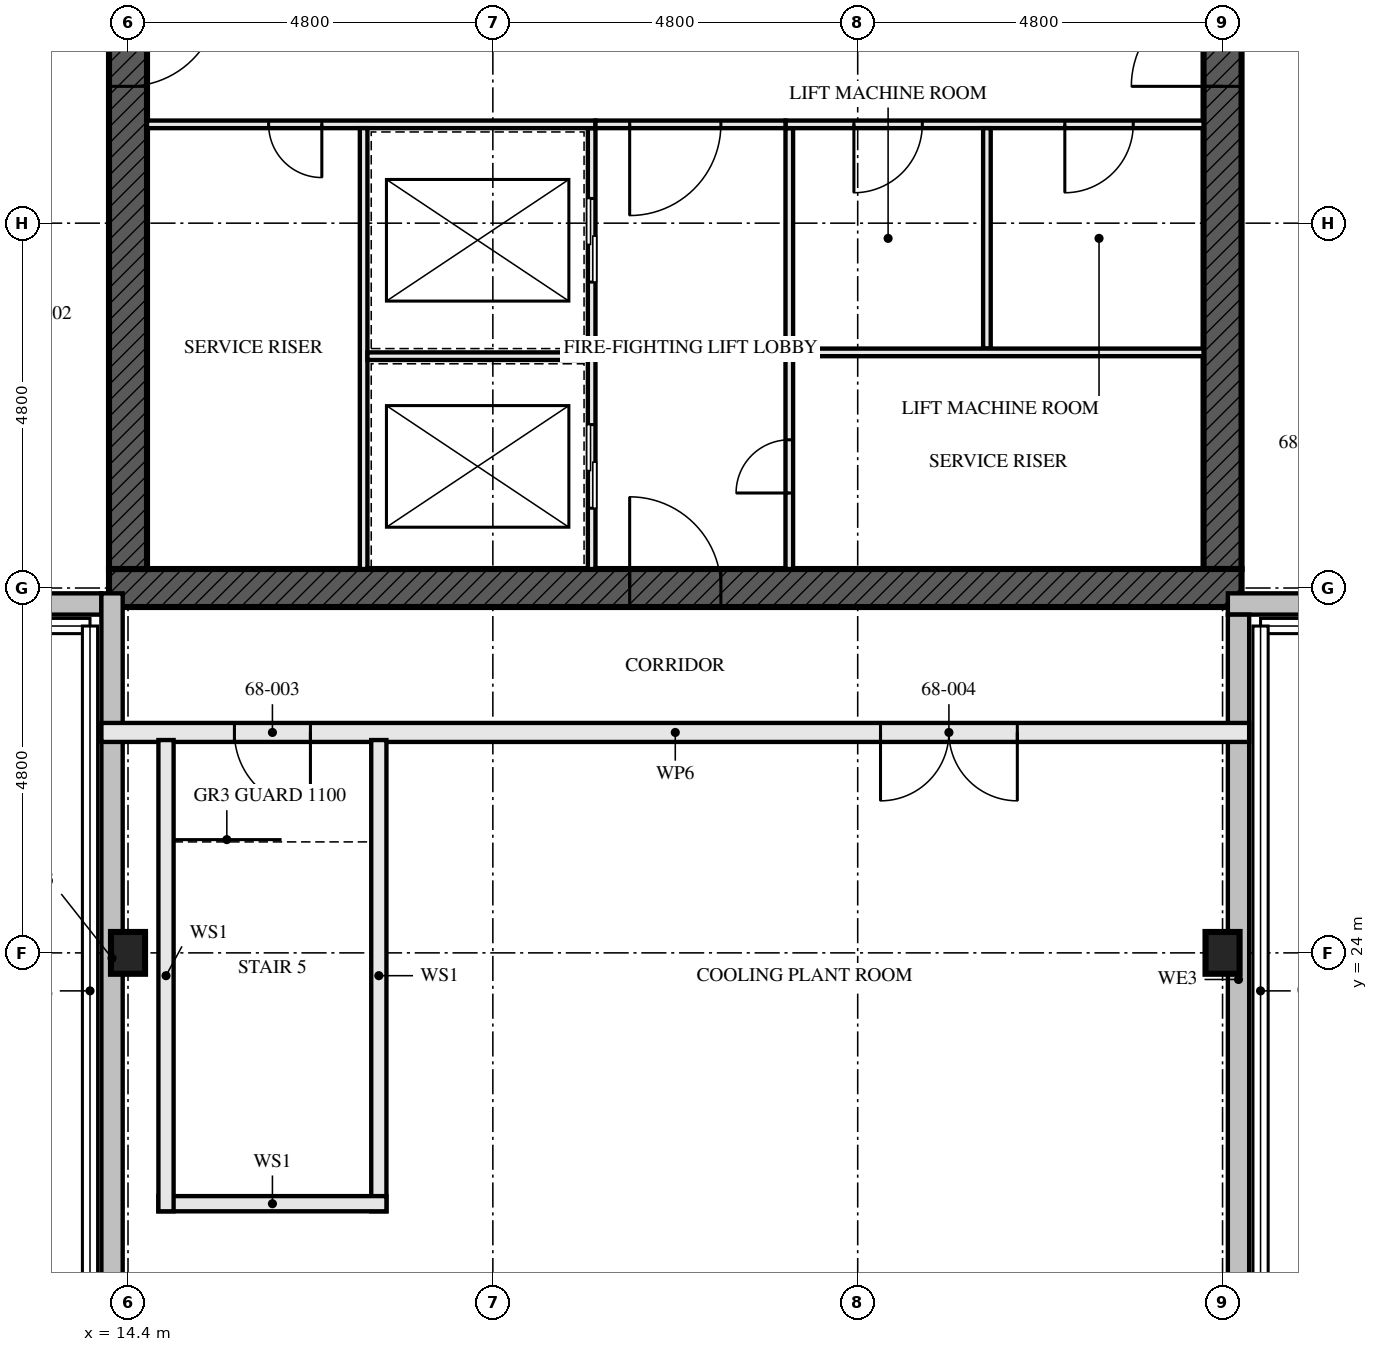
"""IFC4 building model, lengths in metres.
Left out: names, types, materials, properties, quantities, classifications, styles, units other than length and angle.
Written with IfcOpenShell. Run it as: python <this file> out.ifc"""

import sys

from ifc_helpers import new_model, si_unit, direction, frame, frame_2d, origin, origin_2d, place, context, subcontext, project, spatial, rectangle, i_section, extrude, element, fill, save


model = new_model("IFC4")
c1 = context("Model", 3, precision=1e-05, world=origin(), true_north=direction((0.0, 1.0)))
c2 = subcontext(c1, "Body", "Model", "MODEL_VIEW")
j1 = project(units=[si_unit("LENGTHUNIT", "METRE"), si_unit("PLANEANGLEUNIT", "RADIAN")], contexts=[c1])
p1 = place(None, origin())
s1 = spatial("IfcSite", under=j1, at=p1, CompositionType="ELEMENT")
p2 = place(p1, origin())
s2 = spatial("IfcBuilding", under=s1, at=p2, CompositionType="ELEMENT")
p3 = place(p2, frame((0.0, 0.0, 248.0)))
s3 = spatial("IfcBuildingStorey", under=s2, at=p3, CompositionType="ELEMENT", Elevation=248.0)
for number, where, z_axis, x_axis in (
    (1, (14.4, 24.0, 0.0), (0.0, 0.0, 1.0), (1.0, 0.0, 0.0)),
    (2, (28.8, 24.0, 0.0), (0.0, 0.0, 1.0), (1.0, 0.0, 0.0)),
):
    element("IfcColumn", number, at=place(p3, frame(where, z_axis=z_axis, x_axis=x_axis)), inside=s3, PredefinedType="COLUMN", context=c2, shape_type="SweptSolid", body=[
        extrude(i_section(OverallWidth=0.448, OverallDepth=0.55, WebThickness=0.072, FlangeThickness=0.115, FilletRadius=0.015, at=origin_2d()), origin(), (0.0, 0.0, 1.0), 4.25),
    ])
p4 = place(p3, frame((14.15, 28.8, -0.25), z_axis=(0.0, 0.0, 1.0), x_axis=(1.0, 0.0, 0.0)))
e3 = element("IfcWall", 3, at=p4, inside=s3, PredefinedType="SHEAR", context=c2, shape_type="SweptSolid", body=[
    extrude(rectangle(XDim=14.9, YDim=0.5, at=frame_2d((7.45, 0.0))), origin(), (0.0, 0.0, 1.0), 4.5),
])
p5 = place(p4, frame((6.85, 0.0, 0.25)))
e4 = element("IfcOpeningElement", 4, at=p5, cuts=e3, PredefinedType="OPENING", context=c2, shape_type="SweptSolid", body=[
    extrude(rectangle(XDim=1.2, YDim=2.1, at=frame_2d((0.6, 1.05))), frame((0.0, 0.26, 0.0), z_axis=(0.0, -1.0, 0.0), x_axis=(1.0, 0.0, 0.0)), (0.0, 0.0, 1.0), 0.521),
])
p6 = place(p3, frame((14.4, 42.95, -0.25), z_axis=(0.0, 0.0, 1.0), x_axis=(0.0, -1.0, 0.0)))
e5 = element("IfcWall", 5, at=p6, inside=s3, PredefinedType="SHEAR", context=c2, shape_type="SweptSolid", body=[
    extrude(rectangle(XDim=13.9, YDim=0.5, at=frame_2d((6.95, 0.0))), origin(), (0.0, 0.0, 1.0), 4.5),
])
p7 = place(p6, frame((6.35, 0.0, 0.25)))
e6 = element("IfcOpeningElement", 6, at=p7, cuts=e5, PredefinedType="OPENING", context=c2, shape_type="SweptSolid", body=[
    extrude(rectangle(XDim=1.2, YDim=2.1, at=frame_2d((0.6, 1.05))), frame((0.0, 0.26, 0.0), z_axis=(0.0, -1.0, 0.0), x_axis=(1.0, 0.0, 0.0)), (0.0, 0.0, 1.0), 0.521),
])
p8 = place(p3, frame((28.8, 29.05, -0.25), z_axis=(0.0, 0.0, 1.0), x_axis=(0.0, 1.0, 0.0)))
e7 = element("IfcWall", 7, at=p8, inside=s3, PredefinedType="SHEAR", context=c2, shape_type="SweptSolid", body=[
    extrude(rectangle(XDim=13.9, YDim=0.5, at=frame_2d((6.95, 0.0))), origin(), (0.0, 0.0, 1.0), 4.5),
])
p9 = place(p8, frame((6.35, 0.0, 0.25)))
e8 = element("IfcOpeningElement", 8, at=p9, cuts=e7, PredefinedType="OPENING", context=c2, shape_type="SweptSolid", body=[
    extrude(rectangle(XDim=1.2, YDim=2.1, at=frame_2d((0.6, 1.05))), frame((0.0, 0.26, 0.0), z_axis=(0.0, -1.0, 0.0), x_axis=(1.0, 0.0, 0.0)), (0.0, 0.0, 1.0), 0.521),
])
p10 = place(p3, frame((28.87, 28.59, 4.5), z_axis=(0.0, 0.0, 1.0), x_axis=(1.0, 0.0, 0.0)))
e9 = element("IfcWall", 9, at=p10, inside=s3, PredefinedType="PARAPET", context=c2, shape_type="SweptSolid", body=[
    extrude(rectangle(XDim=9.6, YDim=0.28, at=frame_2d((4.8, 0.0))), origin(), (0.0, 0.0, 1.0), 1.1),
])
for number, where, z_axis, x_axis in (
    (10, (4.45, 28.59, 4.5), (0.0, 0.0, 1.0), (1.0, 0.0, 0.0)),
    (11, (14.19, 28.73, 4.5), (0.0, 0.0, 1.0), (0.0, -1.0, 0.0)),
):
    element("IfcWall", number, at=place(p3, frame(where, z_axis=z_axis, x_axis=x_axis)), inside=s3, PredefinedType="PARAPET", context=c2, shape_type="SweptSolid", body=[
        extrude(rectangle(XDim=9.6, YDim=0.28, at=frame_2d((4.8, 0.0))), origin(), (0.0, 0.0, 1.0), 1.1),
    ])
p11 = place(p3, frame((29.01, 18.85, 4.5), z_axis=(0.0, 0.0, 1.0), x_axis=(0.0, 1.0, 0.0)))
e12 = element("IfcWall", 12, at=p11, inside=s3, PredefinedType="PARAPET", context=c2, shape_type="SweptSolid", body=[
    extrude(rectangle(XDim=9.6, YDim=0.28, at=frame_2d((4.8, 0.0))), origin(), (0.0, 0.0, 1.0), 1.1),
])
for number, where, z_axis, x_axis in (
    (13, (14.9, 20.6, 0.0), (0.0, 0.0, 1.0), (0.0, 1.0, 0.0)),
    (14, (17.7, 20.6, 0.0), (0.0, 0.0, 1.0), (0.0, 1.0, 0.0)),
):
    element("IfcWall", number, at=place(p3, frame(where, z_axis=z_axis, x_axis=x_axis)), inside=s3, PredefinedType="SOLIDWALL", context=c2, shape_type="SweptSolid", body=[
        extrude(rectangle(XDim=6.2, YDim=0.2, at=frame_2d((3.1, 0.0))), origin(), (0.0, 0.0, 1.0), 3.478),
    ])
p12 = place(p3, frame((14.8, 20.7, 0.0), z_axis=(0.0, 0.0, 1.0), x_axis=(1.0, 0.0, 0.0)))
e15 = element("IfcWall", 15, at=p12, inside=s3, PredefinedType="SOLIDWALL", context=c2, shape_type="SweptSolid", body=[
    extrude(rectangle(XDim=3.0, YDim=0.2, at=frame_2d((1.5, 0.0))), origin(), (0.0, 0.0, 1.0), 4.25),
])
p13 = place(p3, frame((14.05, 26.9, 0.0), z_axis=(0.0, 0.0, 1.0), x_axis=(1.0, 0.0, 0.0)))
e16 = element("IfcWall", 16, at=p13, inside=s3, PredefinedType="SOLIDWALL", context=c2, shape_type="SweptSolid", body=[
    extrude(rectangle(XDim=15.1, YDim=0.25, at=frame_2d((7.55, 0.0))), origin(), (0.0, 0.0, 1.0), 3.34),
])
p14 = place(p13, frame((1.75, 0.0, 0.0)))
e17 = element("IfcOpeningElement", 17, at=p14, cuts=e16, PredefinedType="OPENING", context=c2, shape_type="SweptSolid", body=[
    extrude(rectangle(XDim=1.0, YDim=2.1, at=frame_2d((0.5, 1.05))), frame((0.0, 0.135, 0.0), z_axis=(0.0, -1.0, 0.0), x_axis=(1.0, 0.0, 0.0)), (0.0, 0.0, 1.0), 0.271),
])
p15 = place(p13, frame((10.25, 0.0, 0.0)))
e18 = element("IfcOpeningElement", 18, at=p15, cuts=e16, PredefinedType="OPENING", context=c2, shape_type="SweptSolid", body=[
    extrude(rectangle(XDim=1.8, YDim=2.4, at=frame_2d((0.9, 1.2))), frame((0.0, 0.135, 0.0), z_axis=(0.0, -1.0, 0.0), x_axis=(1.0, 0.0, 0.0)), (0.0, 0.0, 1.0), 0.271),
])
p16 = place(p3, frame((20.5, 29.05, 0.0), z_axis=(0.0, 0.0, 1.0), x_axis=(0.0, 1.0, 0.0)))
e19 = element("IfcWall", 19, at=p16, inside=s3, PredefinedType="SOLIDWALL", context=c2, shape_type="SweptSolid", body=[
    extrude(rectangle(XDim=5.8, YDim=0.1, at=frame_2d((2.9, 0.0))), origin(), (0.0, 0.0, 1.0), 4.25),
])
p17 = place(p16, frame((0.8, 0.0, 0.0)))
e20 = element("IfcOpeningElement", 20, at=p17, cuts=e19, PredefinedType="OPENING", context=c2, shape_type="SweptSolid", body=[
    extrude(rectangle(XDim=1.1, YDim=2.3, at=frame_2d((0.55, 1.15))), frame((0.0, 0.061, 0.0), z_axis=(0.0, -1.0, 0.0), x_axis=(1.0, 0.0, 0.0)), (0.0, 0.0, 1.0), 0.121),
])
p18 = place(p16, frame((3.775, 0.0, 0.0)))
e21 = element("IfcOpeningElement", 21, at=p18, cuts=e19, PredefinedType="OPENING", context=c2, shape_type="SweptSolid", body=[
    extrude(rectangle(XDim=1.1, YDim=2.3, at=frame_2d((0.55, 1.15))), frame((0.0, 0.061, 0.0), z_axis=(0.0, -1.0, 0.0), x_axis=(1.0, 0.0, 0.0)), (0.0, 0.0, 1.0), 0.121),
])
p19 = place(p3, frame((23.1, 29.05, 0.0), z_axis=(0.0, 0.0, 1.0), x_axis=(0.0, 1.0, 0.0)))
e22 = element("IfcWall", 22, at=p19, inside=s3, PredefinedType="SOLIDWALL", context=c2, shape_type="SweptSolid", body=[
    extrude(rectangle(XDim=5.8, YDim=0.1, at=frame_2d((2.9, 0.0))), origin(), (0.0, 0.0, 1.0), 4.25),
])
p20 = place(p19, frame((1.0, 0.0, 0.0)))
e23 = element("IfcOpeningElement", 23, at=p20, cuts=e22, PredefinedType="OPENING", context=c2, shape_type="SweptSolid", body=[
    extrude(rectangle(XDim=0.7, YDim=2.1, at=frame_2d((0.35, 1.05))), frame((0.0, 0.061, 0.0), z_axis=(0.0, -1.0, 0.0), x_axis=(1.0, 0.0, 0.0)), (0.0, 0.0, 1.0), 0.121),
])
p21 = place(p3, frame((14.65, 34.9, 0.0), z_axis=(0.0, 0.0, 1.0), x_axis=(1.0, 0.0, 0.0)))
e24 = element("IfcWall", 24, at=p21, inside=s3, PredefinedType="SOLIDWALL", context=c2, shape_type="SweptSolid", body=[
    extrude(rectangle(XDim=5.9, YDim=0.1, at=frame_2d((2.95, 0.0))), origin(), (0.0, 0.0, 1.0), 4.25),
])
p22 = place(p21, frame((1.6, 0.0, 0.0)))
e25 = element("IfcOpeningElement", 25, at=p22, cuts=e24, PredefinedType="OPENING", context=c2, shape_type="SweptSolid", body=[
    extrude(rectangle(XDim=0.7, YDim=2.1, at=frame_2d((0.35, 1.05))), frame((0.0, 0.061, 0.0), z_axis=(0.0, -1.0, 0.0), x_axis=(1.0, 0.0, 0.0)), (0.0, 0.0, 1.0), 0.121),
])
p23 = place(p3, frame((23.05, 34.9, 0.0), z_axis=(0.0, 0.0, 1.0), x_axis=(1.0, 0.0, 0.0)))
e26 = element("IfcWall", 26, at=p23, inside=s3, PredefinedType="SOLIDWALL", context=c2, shape_type="SweptSolid", body=[
    extrude(rectangle(XDim=5.5, YDim=0.1, at=frame_2d((2.75, 0.0))), origin(), (0.0, 0.0, 1.0), 4.25),
])
p24 = place(p23, frame((0.9, 0.0, 0.0)))
e27 = element("IfcOpeningElement", 27, at=p24, cuts=e26, PredefinedType="OPENING", context=c2, shape_type="SweptSolid", body=[
    extrude(rectangle(XDim=0.9, YDim=2.1, at=frame_2d((0.45, 1.05))), frame((0.0, 0.061, 0.0), z_axis=(0.0, -1.0, 0.0), x_axis=(1.0, 0.0, 0.0)), (0.0, 0.0, 1.0), 0.121),
])
p25 = place(p23, frame((3.675, 0.0, 0.0)))
e28 = element("IfcOpeningElement", 28, at=p25, cuts=e26, PredefinedType="OPENING", context=c2, shape_type="SweptSolid", body=[
    extrude(rectangle(XDim=0.9, YDim=2.1, at=frame_2d((0.45, 1.05))), frame((0.0, 0.061, 0.0), z_axis=(0.0, -1.0, 0.0), x_axis=(1.0, 0.0, 0.0)), (0.0, 0.0, 1.0), 0.121),
])
p26 = place(p3, frame((20.55, 34.9, 0.0), z_axis=(0.0, 0.0, 1.0), x_axis=(1.0, 0.0, 0.0)))
e29 = element("IfcWall", 29, at=p26, inside=s3, PredefinedType="SOLIDWALL", context=c2, shape_type="SweptSolid", body=[
    extrude(rectangle(XDim=2.5, YDim=0.1, at=frame_2d((1.25, 0.0))), origin(), (0.0, 0.0, 1.0), 3.04),
])
p27 = place(p26, frame((0.45, 0.0, 0.0)))
e30 = element("IfcOpeningElement", 30, at=p27, cuts=e29, PredefinedType="OPENING", context=c2, shape_type="SweptSolid", body=[
    extrude(rectangle(XDim=1.2, YDim=2.1, at=frame_2d((0.6, 1.05))), frame((0.0, 0.061, 0.0), z_axis=(0.0, -1.0, 0.0), x_axis=(1.0, 0.0, 0.0)), (0.0, 0.0, 1.0), 0.121),
])
p28 = place(p3, frame((17.5, 29.05, 0.0), z_axis=(0.0, 0.0, 1.0), x_axis=(0.0, 1.0, 0.0)))
e31 = element("IfcWall", 31, at=p28, inside=s3, PredefinedType="SOLIDWALL", context=c2, shape_type="SweptSolid", body=[
    extrude(rectangle(XDim=5.8, YDim=0.1, at=frame_2d((2.9, 0.0))), origin(), (0.0, 0.0, 1.0), 4.25),
])
p29 = place(p3, frame((17.55, 31.85, 0.0), z_axis=(0.0, 0.0, 1.0), x_axis=(1.0, 0.0, 0.0)))
e32 = element("IfcWall", 32, at=p29, inside=s3, PredefinedType="SOLIDWALL", context=c2, shape_type="SweptSolid", body=[
    extrude(rectangle(XDim=2.9, YDim=0.1, at=frame_2d((1.45, 0.0))), origin(), (0.0, 0.0, 1.0), 4.25),
])
p30 = place(p3, frame((25.7, 31.95, 0.0), z_axis=(0.0, 0.0, 1.0), x_axis=(0.0, 1.0, 0.0)))
e33 = element("IfcWall", 33, at=p30, inside=s3, PredefinedType="SOLIDWALL", context=c2, shape_type="SweptSolid", body=[
    extrude(rectangle(XDim=2.9, YDim=0.1, at=frame_2d((1.45, 0.0))), origin(), (0.0, 0.0, 1.0), 4.25),
])
p31 = place(p3, frame((23.15, 31.9, 0.0), z_axis=(0.0, 0.0, 1.0), x_axis=(1.0, 0.0, 0.0)))
e34 = element("IfcWall", 34, at=p31, inside=s3, PredefinedType="SOLIDWALL", context=c2, shape_type="SweptSolid", body=[
    extrude(rectangle(XDim=5.4, YDim=0.1, at=frame_2d((2.7, 0.0))), origin(), (0.0, 0.0, 1.0), 4.25),
])
p32 = place(p14, frame((1.0, 0.0, 0.0), z_axis=(0.0, 0.0, 1.0), x_axis=(-1.0, 0.0, 0.0)))
e35 = element("IfcDoor", 35, at=p32, inside=s3, OperationType="SINGLE_SWING_RIGHT", PredefinedType="DOOR", context=c2, shape_type="SweptSolid", body=[
    extrude(rectangle(XDim=1.0, YDim=2.1, at=frame_2d((0.5, 1.05))), frame((0.0, 0.032, 0.0), z_axis=(0.0, -1.0, 0.0), x_axis=(1.0, 0.0, 0.0)), (0.0, 0.0, 1.0), 0.064),
])
fill(e17, e35)
p33 = place(p15, frame((1.8, 0.0, 0.0), z_axis=(0.0, 0.0, 1.0), x_axis=(-1.0, 0.0, 0.0)))
e36 = element("IfcDoor", 36, at=p33, inside=s3, OperationType="DOUBLE_DOOR_SINGLE_SWING", PredefinedType="DOOR", context=c2, shape_type="SweptSolid", body=[
    extrude(rectangle(XDim=1.8, YDim=2.4, at=frame_2d((0.9, 1.2))), frame((0.0, 0.032, 0.0), z_axis=(0.0, -1.0, 0.0), x_axis=(1.0, 0.0, 0.0)), (0.0, 0.0, 1.0), 0.064),
])
fill(e18, e36)
p34 = place(p17, origin())
e37 = element("IfcDoor", 37, at=p34, inside=s3, OperationType="SLIDING_TO_LEFT", PredefinedType="DOOR", context=c2, shape_type="SweptSolid", body=[
    extrude(rectangle(XDim=1.1, YDim=2.3, at=frame_2d((0.55, 1.15))), frame((0.0, 0.05, 0.0), z_axis=(0.0, -1.0, 0.0), x_axis=(1.0, 0.0, 0.0)), (0.0, 0.0, 1.0), 0.1),
])
fill(e20, e37)
p35 = place(p18, origin())
e38 = element("IfcDoor", 38, at=p35, inside=s3, OperationType="SLIDING_TO_LEFT", PredefinedType="DOOR", context=c2, shape_type="SweptSolid", body=[
    extrude(rectangle(XDim=1.1, YDim=2.3, at=frame_2d((0.55, 1.15))), frame((0.0, 0.05, 0.0), z_axis=(0.0, -1.0, 0.0), x_axis=(1.0, 0.0, 0.0)), (0.0, 0.0, 1.0), 0.1),
])
fill(e21, e38)
p36 = place(p20, origin())
e39 = element("IfcDoor", 39, at=p36, inside=s3, OperationType="SINGLE_SWING_RIGHT", PredefinedType="DOOR", context=c2, shape_type="SweptSolid", body=[
    extrude(rectangle(XDim=0.7, YDim=2.1, at=frame_2d((0.35, 1.05))), frame((0.0, 0.027, 0.0), z_axis=(0.0, -1.0, 0.0), x_axis=(1.0, 0.0, 0.0)), (0.0, 0.0, 1.0), 0.054),
])
fill(e23, e39)
p37 = place(p22, frame((0.7, 0.0, 0.0), z_axis=(0.0, 0.0, 1.0), x_axis=(-1.0, 0.0, 0.0)))
e40 = element("IfcDoor", 40, at=p37, inside=s3, OperationType="SINGLE_SWING_RIGHT", PredefinedType="DOOR", context=c2, shape_type="SweptSolid", body=[
    extrude(rectangle(XDim=0.7, YDim=2.1, at=frame_2d((0.35, 1.05))), frame((0.0, 0.027, 0.0), z_axis=(0.0, -1.0, 0.0), x_axis=(1.0, 0.0, 0.0)), (0.0, 0.0, 1.0), 0.054),
])
fill(e25, e40)
p38 = place(p24, frame((0.9, 0.0, 0.0), z_axis=(0.0, 0.0, 1.0), x_axis=(-1.0, 0.0, 0.0)))
e41 = element("IfcDoor", 41, at=p38, inside=s3, OperationType="SINGLE_SWING_LEFT", PredefinedType="DOOR", context=c2, shape_type="SweptSolid", body=[
    extrude(rectangle(XDim=0.9, YDim=2.1, at=frame_2d((0.45, 1.05))), frame((0.0, 0.027, 0.0), z_axis=(0.0, -1.0, 0.0), x_axis=(1.0, 0.0, 0.0)), (0.0, 0.0, 1.0), 0.054),
])
fill(e27, e41)
p39 = place(p25, frame((0.9, 0.0, 0.0), z_axis=(0.0, 0.0, 1.0), x_axis=(-1.0, 0.0, 0.0)))
e42 = element("IfcDoor", 42, at=p39, inside=s3, OperationType="SINGLE_SWING_LEFT", PredefinedType="DOOR", context=c2, shape_type="SweptSolid", body=[
    extrude(rectangle(XDim=0.9, YDim=2.1, at=frame_2d((0.45, 1.05))), frame((0.0, 0.027, 0.0), z_axis=(0.0, -1.0, 0.0), x_axis=(1.0, 0.0, 0.0)), (0.0, 0.0, 1.0), 0.054),
])
fill(e28, e42)
p40 = place(p27, frame((1.2, 0.0, 0.0), z_axis=(0.0, 0.0, 1.0), x_axis=(-1.0, 0.0, 0.0)))
e43 = element("IfcDoor", 43, at=p40, inside=s3, OperationType="SINGLE_SWING_LEFT", PredefinedType="DOOR", context=c2, shape_type="SweptSolid", body=[
    extrude(rectangle(XDim=1.2, YDim=2.1, at=frame_2d((0.6, 1.05))), frame((0.0, 0.027, 0.0), z_axis=(0.0, -1.0, 0.0), x_axis=(1.0, 0.0, 0.0)), (0.0, 0.0, 1.0), 0.054),
])
fill(e30, e43)
p41 = place(p5, origin())
e44 = element("IfcDoor", 44, at=p41, inside=s3, OperationType="SINGLE_SWING_LEFT", PredefinedType="DOOR", context=c2, shape_type="SweptSolid", body=[
    extrude(rectangle(XDim=1.2, YDim=2.1, at=frame_2d((0.6, 1.05))), frame((0.0, 0.027, 0.0), z_axis=(0.0, -1.0, 0.0), x_axis=(1.0, 0.0, 0.0)), (0.0, 0.0, 1.0), 0.054),
])
fill(e4, e44)
p42 = place(p7, origin())
e45 = element("IfcDoor", 45, at=p42, inside=s3, OperationType="SINGLE_SWING_LEFT", PredefinedType="DOOR", context=c2, shape_type="SweptSolid", body=[
    extrude(rectangle(XDim=1.2, YDim=2.1, at=frame_2d((0.6, 1.05))), frame((0.0, 0.027, 0.0), z_axis=(0.0, -1.0, 0.0), x_axis=(1.0, 0.0, 0.0)), (0.0, 0.0, 1.0), 0.054),
])
fill(e6, e45)
p43 = place(p9, origin())
e46 = element("IfcDoor", 46, at=p43, inside=s3, OperationType="SINGLE_SWING_LEFT", PredefinedType="DOOR", context=c2, shape_type="SweptSolid", body=[
    extrude(rectangle(XDim=1.2, YDim=2.1, at=frame_2d((0.6, 1.05))), frame((0.0, 0.027, 0.0), z_axis=(0.0, -1.0, 0.0), x_axis=(1.0, 0.0, 0.0)), (0.0, 0.0, 1.0), 0.054),
])
fill(e8, e46)
save(model, sys.argv[1])
